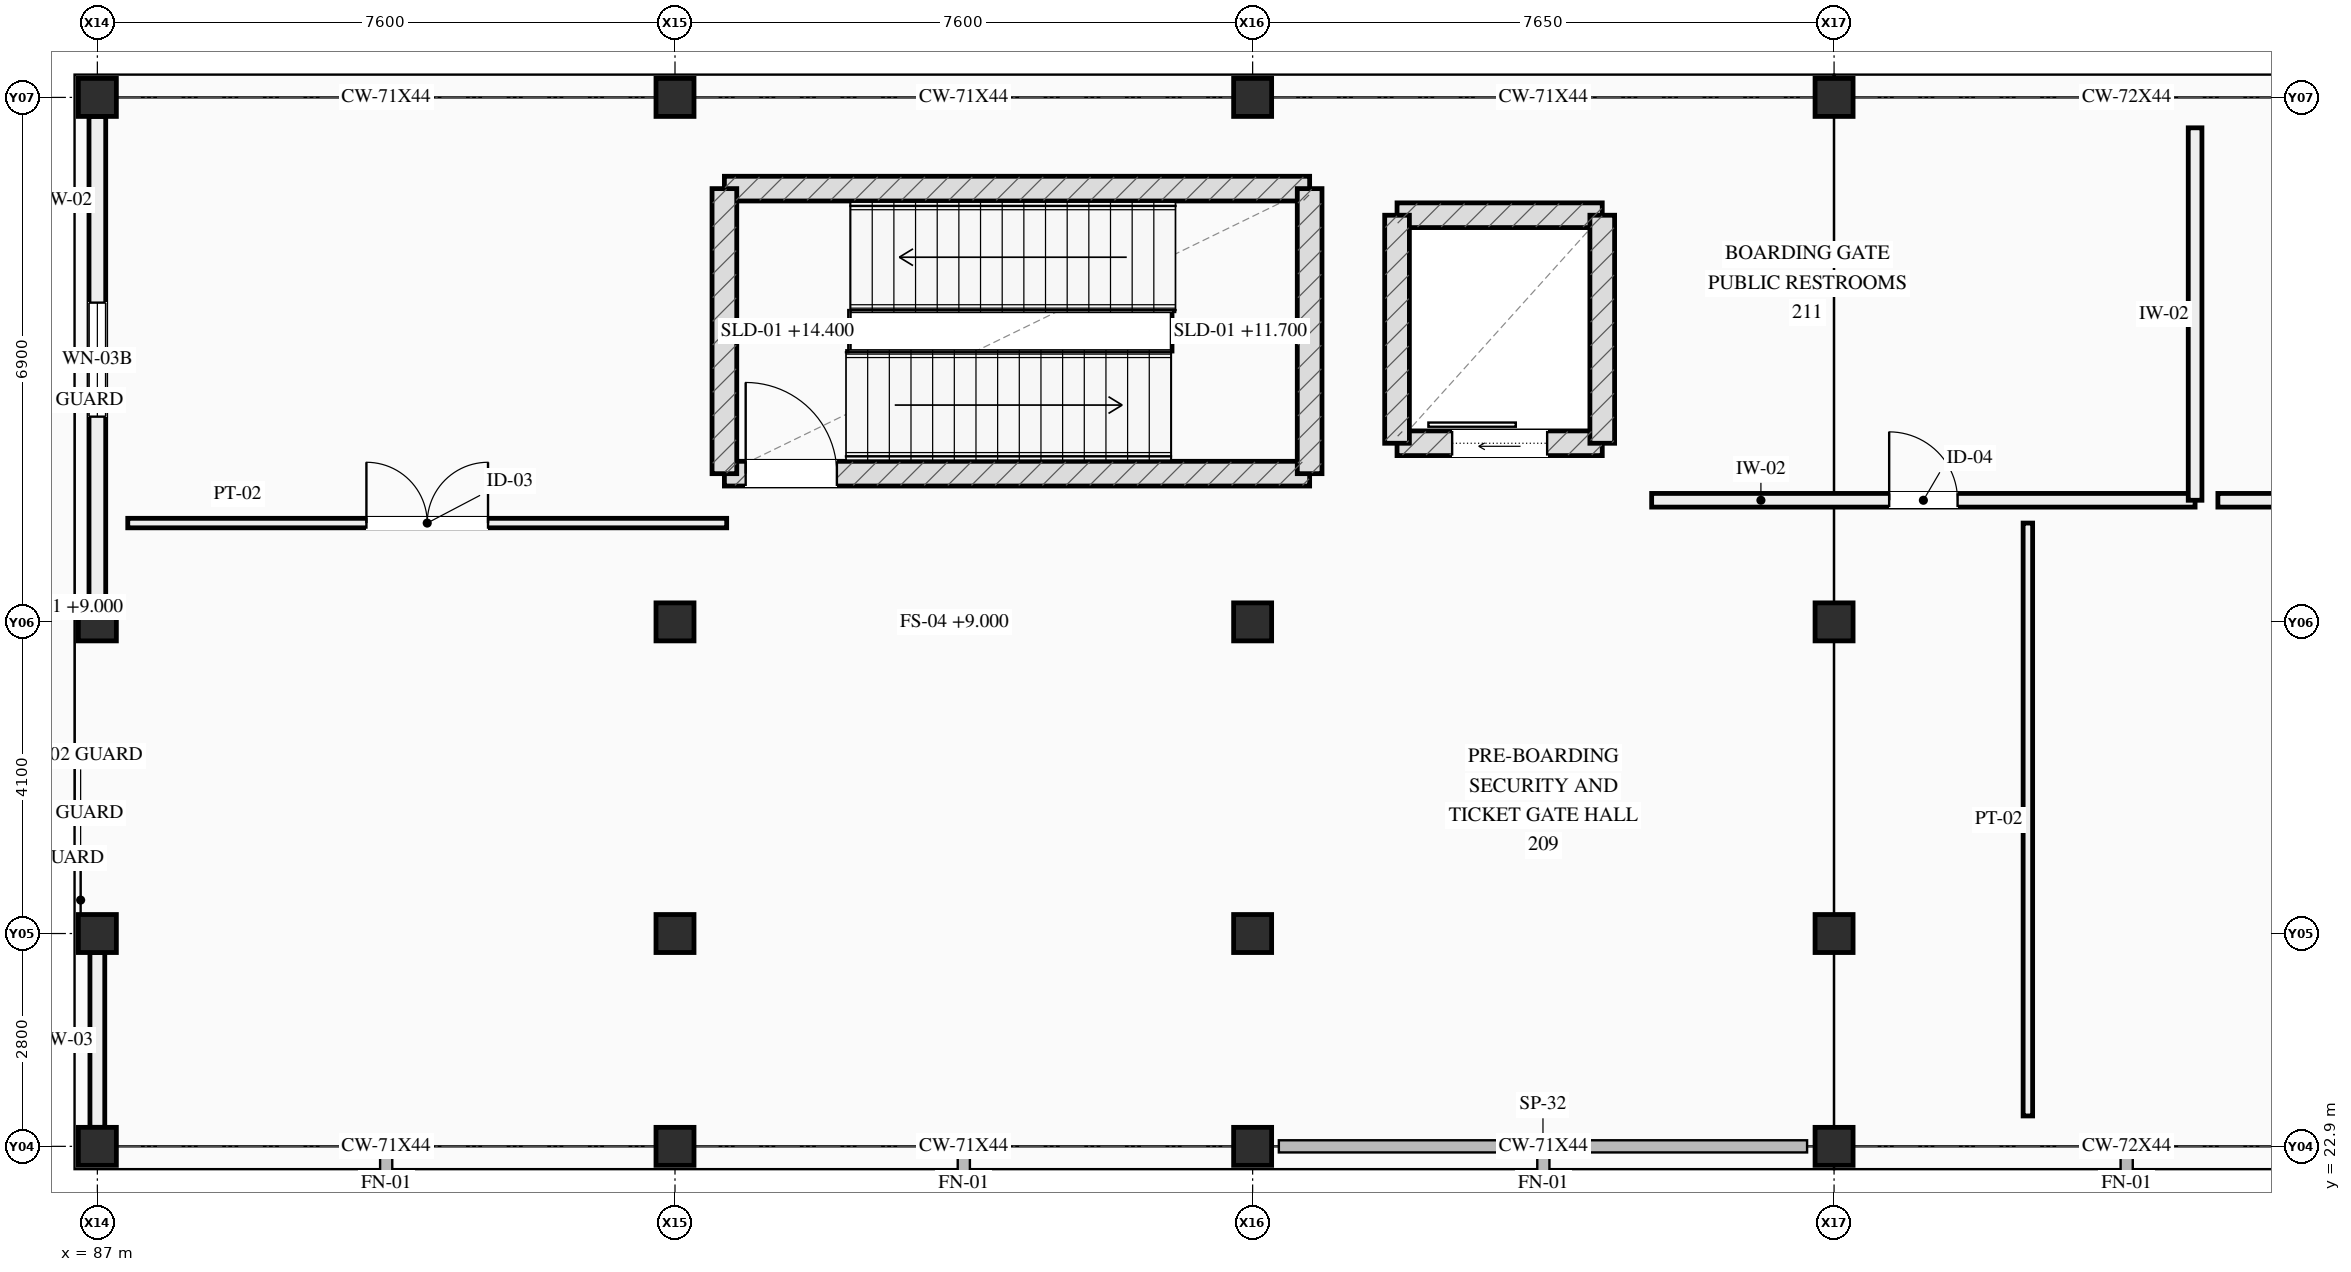
"""IFC4 building model, lengths in metres.
Left out: names, types, materials, properties, quantities, classifications, styles, units other than length and angle.
Written with IfcOpenShell. Run it as: python <this file> out.ifc"""

import sys

from ifc_helpers import new_model, si_unit, direction, frame, frame_2d, origin, origin_2d, place, context, subcontext, project, spatial, rectangle, extrude, element, fill, save


model = new_model("IFC4")
c1 = context("Model", 3, precision=1e-05, world=origin(), true_north=direction((0.0, 1.0)))
c2 = subcontext(c1, "Body", "Model", "MODEL_VIEW")
j1 = project(units=[si_unit("LENGTHUNIT", "METRE"), si_unit("PLANEANGLEUNIT", "RADIAN")], contexts=[c1])
p1 = place(None, origin())
s1 = spatial("IfcSite", under=j1, at=p1, CompositionType="ELEMENT")
p2 = place(p1, origin())
s2 = spatial("IfcBuilding", under=s1, at=p2, CompositionType="ELEMENT")
p3 = place(p2, frame((0.0, 0.0, 9.0)))
s3 = spatial("IfcBuildingStorey", under=s2, at=p3, CompositionType="ELEMENT", Elevation=9.0)
for number, where, z_axis, x_axis in (
    (1, (87.0, 22.9, 0.0), (0.0, 0.0, 1.0), (1.0, 0.0, 0.0)),
    (2, (87.0, 25.7, 0.0), (0.0, 0.0, 1.0), (1.0, 0.0, 0.0)),
    (3, (87.0, 29.8, 0.0), (0.0, 0.0, 1.0), (1.0, 0.0, 0.0)),
    (4, (87.0, 36.7, 0.0), (0.0, 0.0, 1.0), (1.0, 0.0, 0.0)),
    (5, (94.6, 22.9, 0.0), (0.0, 0.0, 1.0), (1.0, 0.0, 0.0)),
    (6, (94.6, 25.7, 0.0), (0.0, 0.0, 1.0), (1.0, 0.0, 0.0)),
    (7, (94.6, 29.8, 0.0), (0.0, 0.0, 1.0), (1.0, 0.0, 0.0)),
    (8, (94.6, 36.7, 0.0), (0.0, 0.0, 1.0), (1.0, 0.0, 0.0)),
    (9, (102.2, 22.9, 0.0), (0.0, 0.0, 1.0), (1.0, 0.0, 0.0)),
    (10, (102.2, 25.7, 0.0), (0.0, 0.0, 1.0), (1.0, 0.0, 0.0)),
    (11, (102.2, 29.8, 0.0), (0.0, 0.0, 1.0), (1.0, 0.0, 0.0)),
    (12, (102.2, 36.7, 0.0), (0.0, 0.0, 1.0), (1.0, 0.0, 0.0)),
    (13, (109.85, 22.9, 0.0), (0.0, 0.0, 1.0), (1.0, 0.0, 0.0)),
    (14, (109.85, 25.7, 0.0), (0.0, 0.0, 1.0), (1.0, 0.0, 0.0)),
    (15, (109.85, 29.8, 0.0), (0.0, 0.0, 1.0), (1.0, 0.0, 0.0)),
    (16, (109.85, 36.7, 0.0), (0.0, 0.0, 1.0), (1.0, 0.0, 0.0)),
):
    element("IfcColumn", number, at=place(p3, frame(where, z_axis=z_axis, x_axis=x_axis)), inside=s3, PredefinedType="COLUMN", context=c2, shape_type="SweptSolid", body=[
        extrude(rectangle(XDim=0.5, YDim=0.5, at=origin_2d()), origin(), (0.0, 0.0, 1.0), 5.4),
    ])
p4 = place(p3, frame((87.0, 30.05, 0.0), z_axis=(0.0, 0.0, 1.0), x_axis=(0.0, 1.0, 0.0)))
e17 = element("IfcWall", 17, at=p4, inside=s3, PredefinedType="STANDARD", context=c2, shape_type="SweptSolid", body=[
    extrude(rectangle(XDim=6.4, YDim=0.22, at=frame_2d((3.2, 0.0))), origin(), (0.0, 0.0, 1.0), 4.48),
])
p5 = place(p4, frame((2.45, 0.0, 1.0)))
e18 = element("IfcOpeningElement", 18, at=p5, cuts=e17, PredefinedType="OPENING", context=c2, shape_type="SweptSolid", body=[
    extrude(rectangle(XDim=1.5, YDim=1.25, at=frame_2d((0.75, 0.625))), frame((0.0, 0.12, 0.0), z_axis=(0.0, -1.0, 0.0), x_axis=(1.0, 0.0, 0.0)), (0.0, 0.0, 1.0), 0.24),
])
p6 = place(p3, frame((87.0, 23.15, 0.0), z_axis=(0.0, 0.0, 1.0), x_axis=(0.0, 1.0, 0.0)))
e19 = element("IfcWall", 19, at=p6, inside=s3, PredefinedType="STANDARD", context=c2, shape_type="SweptSolid", body=[
    extrude(rectangle(XDim=2.3, YDim=0.195, at=frame_2d((1.15, 0.0))), origin(), (0.0, 0.0, 1.0), 4.48),
])
p7 = place(p3, frame((95.25, 31.75, 0.0), z_axis=(0.0, 0.0, 1.0), x_axis=(1.0, 0.0, 0.0)))
e20 = element("IfcWall", 20, at=p7, inside=s3, PredefinedType="SHEAR", context=c2, shape_type="SweptSolid", body=[
    extrude(rectangle(XDim=7.7, YDim=0.325, at=frame_2d((3.85, 0.0))), origin(), (0.0, 0.0, 1.0), 5.175),
])
p8 = place(p7, frame((0.28, 0.0, 0.0)))
e21 = element("IfcOpeningElement", 21, at=p8, cuts=e20, PredefinedType="OPENING", context=c2, shape_type="SweptSolid", body=[
    extrude(rectangle(XDim=1.2, YDim=2.2, at=frame_2d((0.6, 1.1))), frame((0.0, 0.172, 0.0), z_axis=(0.0, -1.0, 0.0), x_axis=(1.0, 0.0, 0.0)), (0.0, 0.0, 1.0), 0.345),
])
p9 = place(p3, frame((102.95, 35.5, 0.0), z_axis=(0.0, 0.0, 1.0), x_axis=(-1.0, 0.0, 0.0)))
e22 = element("IfcWall", 22, at=p9, inside=s3, PredefinedType="SHEAR", context=c2, shape_type="SweptSolid", body=[
    extrude(rectangle(XDim=7.7, YDim=0.325, at=frame_2d((3.85, 0.0))), origin(), (0.0, 0.0, 1.0), 5.175),
])
for number, where, z_axis, x_axis in (
    (23, (95.25, 35.5, 0.0), (0.0, 0.0, 1.0), (0.0, -1.0, 0.0)),
    (24, (102.95, 31.75, 0.0), (0.0, 0.0, 1.0), (0.0, 1.0, 0.0)),
):
    element("IfcWall", number, at=place(p3, frame(where, z_axis=z_axis, x_axis=x_axis)), inside=s3, PredefinedType="SHEAR", context=c2, shape_type="SweptSolid", body=[
        extrude(rectangle(XDim=3.75, YDim=0.325, at=frame_2d((1.875, 0.0))), origin(), (0.0, 0.0, 1.0), 5.175),
    ])
p10 = place(p3, frame((104.1, 32.15, 0.0), z_axis=(0.0, 0.0, 1.0), x_axis=(1.0, 0.0, 0.0)))
e25 = element("IfcWall", 25, at=p10, inside=s3, PredefinedType="SHEAR", context=c2, shape_type="SweptSolid", body=[
    extrude(rectangle(XDim=2.7, YDim=0.325, at=frame_2d((1.35, 0.0))), origin(), (0.0, 0.0, 1.0), 5.175),
])
p11 = place(p10, frame((0.725, 0.0, 0.0)))
e26 = element("IfcOpeningElement", 26, at=p11, cuts=e25, PredefinedType="OPENING", context=c2, shape_type="SweptSolid", body=[
    extrude(rectangle(XDim=1.25, YDim=2.2, at=frame_2d((0.625, 1.1))), frame((0.0, 0.172, 0.0), z_axis=(0.0, -1.0, 0.0), x_axis=(1.0, 0.0, 0.0)), (0.0, 0.0, 1.0), 0.345),
])
p12 = place(p3, frame((104.1, 35.15, 0.0), z_axis=(0.0, 0.0, 1.0), x_axis=(1.0, 0.0, 0.0)))
e27 = element("IfcWall", 27, at=p12, inside=s3, PredefinedType="SHEAR", context=c2, shape_type="SweptSolid", body=[
    extrude(rectangle(XDim=2.7, YDim=0.325, at=frame_2d((1.35, 0.0))), origin(), (0.0, 0.0, 1.0), 5.175),
])
for number, where, z_axis, x_axis in (
    (28, (104.1, 32.15, 0.0), (0.0, 0.0, 1.0), (0.0, 1.0, 0.0)),
    (29, (106.8, 32.15, 0.0), (0.0, 0.0, 1.0), (0.0, 1.0, 0.0)),
):
    element("IfcWall", number, at=place(p3, frame(where, z_axis=z_axis, x_axis=x_axis)), inside=s3, PredefinedType="SHEAR", context=c2, shape_type="SweptSolid", body=[
        extrude(rectangle(XDim=3.0, YDim=0.325, at=frame_2d((1.5, 0.0))), origin(), (0.0, 0.0, 1.0), 5.175),
    ])
p13 = place(p3, frame((87.4, 31.1, 0.0), z_axis=(0.0, 0.0, 1.0), x_axis=(1.0, 0.0, 0.0)))
e30 = element("IfcWall", 30, at=p13, inside=s3, PredefinedType="PARTITIONING", context=c2, shape_type="SweptSolid", body=[
    extrude(rectangle(XDim=7.88, YDim=0.125, at=frame_2d((3.94, 0.0))), origin(), (0.0, 0.0, 1.0), 3.3),
])
p14 = place(p13, frame((3.14, 0.0, 0.0)))
e31 = element("IfcOpeningElement", 31, at=p14, cuts=e30, PredefinedType="OPENING", context=c2, shape_type="SweptSolid", body=[
    extrude(rectangle(XDim=1.6, YDim=2.2, at=frame_2d((0.8, 1.1))), frame((0.0, 0.073, 0.0), z_axis=(0.0, -1.0, 0.0), x_axis=(1.0, 0.0, 0.0)), (0.0, 0.0, 1.0), 0.145),
])
p15 = place(p3, frame((112.4, 23.3, 0.0), z_axis=(0.0, 0.0, 1.0), x_axis=(0.0, 1.0, 0.0)))
e32 = element("IfcWall", 32, at=p15, inside=s3, PredefinedType="PARTITIONING", context=c2, shape_type="SweptSolid", body=[
    extrude(rectangle(XDim=7.8, YDim=0.125, at=frame_2d((3.9, 0.0))), origin(), (0.0, 0.0, 1.0), 3.3),
])
p16 = place(p3, frame((107.45, 31.4, 0.0), z_axis=(0.0, 0.0, 1.0), x_axis=(1.0, 0.0, 0.0)))
e33 = element("IfcWall", 33, at=p16, inside=s3, PredefinedType="PLUMBINGWALL", context=c2, shape_type="SweptSolid", body=[
    extrude(rectangle(XDim=7.15, YDim=0.18, at=frame_2d((3.575, 0.0))), origin(), (0.0, 0.0, 1.0), 3.3),
])
p17 = place(p16, frame((3.125, 0.0, 0.0)))
e34 = element("IfcOpeningElement", 34, at=p17, cuts=e33, PredefinedType="OPENING", context=c2, shape_type="SweptSolid", body=[
    extrude(rectangle(XDim=0.9, YDim=2.1, at=frame_2d((0.45, 1.05))), frame((0.0, 0.1, 0.0), z_axis=(0.0, -1.0, 0.0), x_axis=(1.0, 0.0, 0.0)), (0.0, 0.0, 1.0), 0.2),
])
p18 = place(p3, frame((114.6, 31.4, 0.0), z_axis=(0.0, 0.0, 1.0), x_axis=(0.0, 1.0, 0.0)))
e35 = element("IfcWall", 35, at=p18, inside=s3, PredefinedType="PLUMBINGWALL", context=c2, shape_type="SweptSolid", body=[
    extrude(rectangle(XDim=4.9, YDim=0.18, at=frame_2d((2.45, 0.0))), origin(), (0.0, 0.0, 1.0), 3.3),
])
p19 = place(p3, frame((114.9, 31.4, 0.0), z_axis=(0.0, 0.0, 1.0), x_axis=(1.0, 0.0, 0.0)))
e36 = element("IfcWall", 36, at=p19, inside=s3, PredefinedType="PLUMBINGWALL", context=c2, shape_type="SweptSolid", body=[
    extrude(rectangle(XDim=5.3, YDim=0.18, at=frame_2d((2.65, 0.0))), origin(), (0.0, 0.0, 1.0), 3.3),
])
p20 = place(p19, frame((3.59, 0.0, 0.0)))
e37 = element("IfcOpeningElement", 37, at=p20, cuts=e36, PredefinedType="OPENING", context=c2, shape_type="SweptSolid", body=[
    extrude(rectangle(XDim=0.92, YDim=2.1, at=frame_2d((0.46, 1.05))), frame((0.0, 0.1, 0.0), z_axis=(0.0, -1.0, 0.0), x_axis=(1.0, 0.0, 0.0)), (0.0, 0.0, 1.0), 0.2),
])
p21 = place(p5, origin())
e38 = element("IfcWindow", 38, at=p21, inside=s3, PartitioningType="SINGLE_PANEL", PredefinedType="WINDOW", context=c2, shape_type="SweptSolid", body=[
    extrude(rectangle(XDim=1.5, YDim=1.25, at=frame_2d((0.75, 0.625))), frame((0.0, 0.03, 0.0), z_axis=(0.0, -1.0, 0.0), x_axis=(1.0, 0.0, 0.0)), (0.0, 0.0, 1.0), 0.06),
])
fill(e18, e38)
p22 = place(p8, origin())
e39 = element("IfcDoor", 39, at=p22, inside=s3, OperationType="SINGLE_SWING_LEFT", PredefinedType="DOOR", context=c2, shape_type="SweptSolid", body=[
    extrude(rectangle(XDim=1.2, YDim=2.2, at=frame_2d((0.6, 1.1))), frame((0.0, 0.025, 0.0), z_axis=(0.0, -1.0, 0.0), x_axis=(1.0, 0.0, 0.0)), (0.0, 0.0, 1.0), 0.05),
])
fill(e21, e39)
p23 = place(p11, origin())
e40 = element("IfcDoor", 40, at=p23, inside=s3, OperationType="SLIDING_TO_LEFT", PredefinedType="DOOR", context=c2, shape_type="SweptSolid", body=[
    extrude(rectangle(XDim=1.25, YDim=2.2, at=frame_2d((0.625, 1.1))), frame((0.0, 0.025, 0.0), z_axis=(0.0, -1.0, 0.0), x_axis=(1.0, 0.0, 0.0)), (0.0, 0.0, 1.0), 0.05),
])
fill(e26, e40)
p24 = place(p14, origin())
e41 = element("IfcDoor", 41, at=p24, inside=s3, OperationType="DOUBLE_DOOR_SINGLE_SWING", PredefinedType="DOOR", context=c2, shape_type="SweptSolid", body=[
    extrude(rectangle(XDim=1.6, YDim=2.2, at=frame_2d((0.8, 1.1))), frame((0.0, 0.025, 0.0), z_axis=(0.0, -1.0, 0.0), x_axis=(1.0, 0.0, 0.0)), (0.0, 0.0, 1.0), 0.05),
])
fill(e31, e41)
p25 = place(p17, origin())
e42 = element("IfcDoor", 42, at=p25, inside=s3, OperationType="SINGLE_SWING_LEFT", PredefinedType="DOOR", context=c2, shape_type="SweptSolid", body=[
    extrude(rectangle(XDim=0.9, YDim=2.1, at=frame_2d((0.45, 1.05))), frame((0.0, 0.025, 0.0), z_axis=(0.0, -1.0, 0.0), x_axis=(1.0, 0.0, 0.0)), (0.0, 0.0, 1.0), 0.05),
])
fill(e34, e42)
save(model, sys.argv[1])
